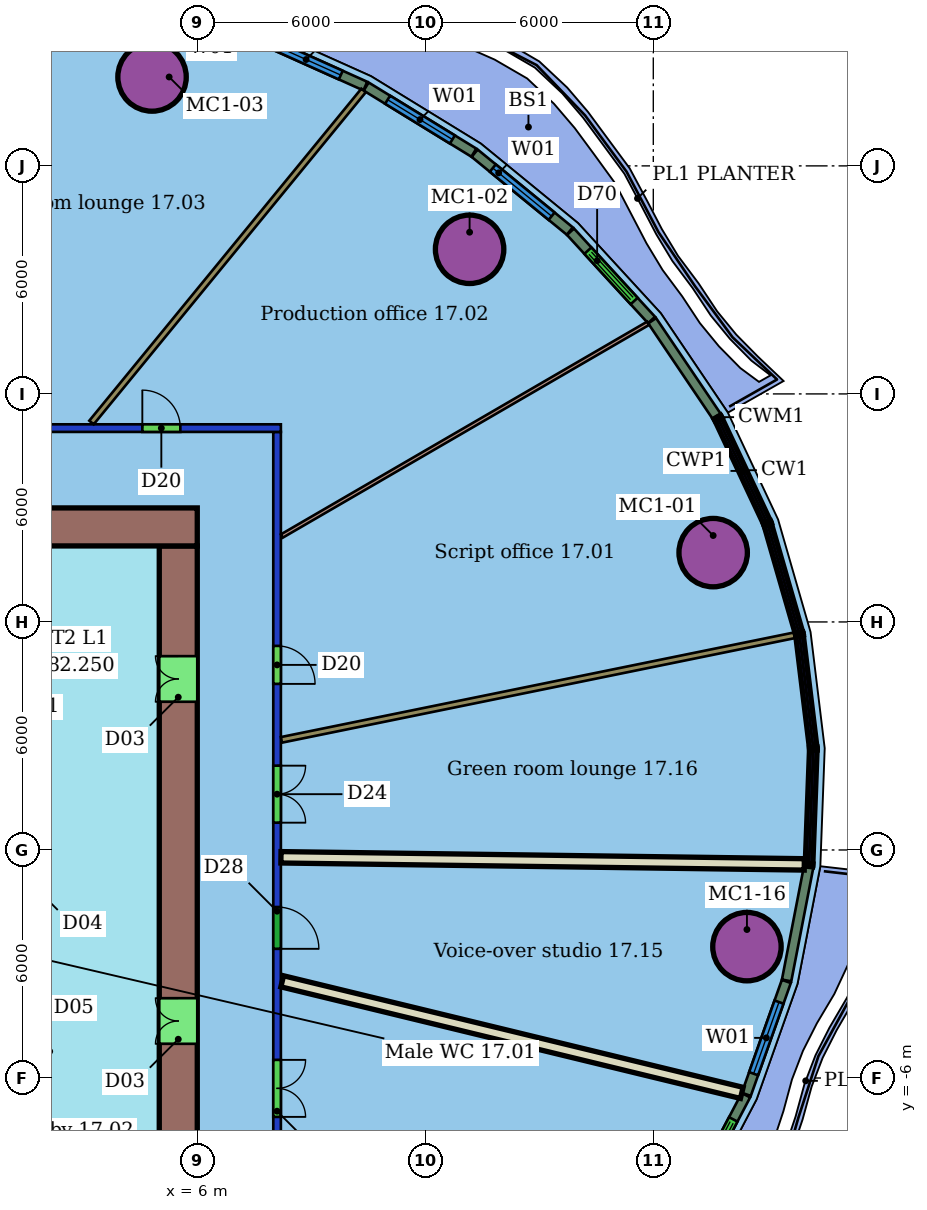
"""IFC4 building model, lengths in metres.
Left out: names, types, materials, properties, quantities, classifications, styles, units other than length and angle.
Written with IfcOpenShell. Run it as: python <this file> out.ifc"""

import sys

from ifc_helpers import new_model, si_unit, direction, frame, frame_2d, origin, origin_2d, place, context, subcontext, project, spatial, rectangle, hollow_circle, extrude, element, fill, save


model = new_model("IFC4")
c1 = context("Model", 3, precision=1e-05, world=origin(), true_north=direction((0.0, 1.0)))
c2 = subcontext(c1, "Body", "Model", "MODEL_VIEW")
j1 = project(units=[si_unit("LENGTHUNIT", "METRE"), si_unit("PLANEANGLEUNIT", "RADIAN")], contexts=[c1])
p1 = place(None, origin())
s1 = spatial("IfcSite", under=j1, at=p1, CompositionType="ELEMENT")
p2 = place(p1, origin())
s2 = spatial("IfcBuilding", under=s1, at=p2, CompositionType="ELEMENT")
p3 = place(p2, frame((0.0, 0.0, 80.4)))
s3 = spatial("IfcBuildingStorey", under=s2, at=p3, CompositionType="ELEMENT", Elevation=80.4)
for number, where, z_axis, x_axis in (
    (1, (19.575, 7.824, 0.0), (0.0, 0.0, 1.0), (1.0, 0.0, 0.0)),
    (2, (13.166, 15.805, 0.0), (0.0, 0.0, 1.0), (1.0, 0.0, 0.0)),
    (3, (4.81, 20.339, 0.0), (0.0, 0.0, 1.0), (1.0, 0.0, 0.0)),
    (4, (20.464, -2.543, 0.0), (0.0, 0.0, 1.0), (1.0, 0.0, 0.0)),
):
    element("IfcColumn", number, at=place(p3, frame(where, z_axis=z_axis, x_axis=x_axis)), inside=s3, PredefinedType="COLUMN", context=c2, shape_type="SweptSolid", body=[
        extrude(hollow_circle(Radius=0.9, WallThickness=0.06, at=origin_2d()), origin(), (0.0, 0.0, 1.0), 3.5),
    ])
p4 = place(p3, frame((-20.2, 11.1, 0.0), z_axis=(0.0, 0.0, 1.0), x_axis=(1.0, 0.0, 0.0)))
e5 = element("IfcWall", 5, at=p4, inside=s3, PredefinedType="PARTITIONING", context=c2, shape_type="SweptSolid", body=[
    extrude(rectangle(XDim=28.4, YDim=0.2, at=frame_2d((14.2, 0.0))), origin(), (0.0, 0.0, 1.0), 2.8),
])
p5 = place(p4, frame((24.754, 0.0, 0.0)))
e6 = element("IfcOpeningElement", 6, at=p5, cuts=e5, PredefinedType="OPENING", context=c2, shape_type="SweptSolid", body=[
    extrude(rectangle(XDim=1.0, YDim=2.1, at=frame_2d((0.5, 1.05))), frame((0.0, 0.11, 0.0), z_axis=(0.0, -1.0, 0.0), x_axis=(1.0, 0.0, 0.0)), (0.0, 0.0, 1.0), 0.22),
])
p6 = place(p4, frame((18.838, 0.0, 0.0)))
e7 = element("IfcOpeningElement", 7, at=p6, cuts=e5, PredefinedType="OPENING", context=c2, shape_type="SweptSolid", body=[
    extrude(rectangle(XDim=1.5, YDim=2.1, at=frame_2d((0.75, 1.05))), frame((0.0, 0.11, 0.0), z_axis=(0.0, -1.0, 0.0), x_axis=(1.0, 0.0, 0.0)), (0.0, 0.0, 1.0), 0.22),
])
p7 = place(p4, frame((14.85, 0.0, 0.0)))
e8 = element("IfcOpeningElement", 8, at=p7, cuts=e5, PredefinedType="OPENING", context=c2, shape_type="SweptSolid", body=[
    extrude(rectangle(XDim=0.9, YDim=2.1, at=frame_2d((0.45, 1.05))), frame((0.0, 0.11, 0.0), z_axis=(0.0, -1.0, 0.0), x_axis=(1.0, 0.0, 0.0)), (0.0, 0.0, 1.0), 0.22),
])
p8 = place(p4, frame((7.977, 0.0, 0.0)))
e9 = element("IfcOpeningElement", 9, at=p8, cuts=e5, PredefinedType="OPENING", context=c2, shape_type="SweptSolid", body=[
    extrude(rectangle(XDim=1.2, YDim=2.1, at=frame_2d((0.6, 1.05))), frame((0.0, 0.11, 0.0), z_axis=(0.0, -1.0, 0.0), x_axis=(1.0, 0.0, 0.0)), (0.0, 0.0, 1.0), 0.22),
])
p9 = place(p3, frame((8.1, 11.0, 0.0), z_axis=(0.0, 0.0, 1.0), x_axis=(0.0, -1.0, 0.0)))
e10 = element("IfcWall", 10, at=p9, inside=s3, PredefinedType="PARTITIONING", context=c2, shape_type="SweptSolid", body=[
    extrude(rectangle(XDim=22.0, YDim=0.2, at=frame_2d((11.0, 0.0))), origin(), (0.0, 0.0, 1.0), 2.8),
])
p10 = place(p9, frame((5.63, 0.0, 0.0)))
e11 = element("IfcOpeningElement", 11, at=p10, cuts=e10, PredefinedType="OPENING", context=c2, shape_type="SweptSolid", body=[
    extrude(rectangle(XDim=1.0, YDim=2.1, at=frame_2d((0.5, 1.05))), frame((0.0, 0.11, 0.0), z_axis=(0.0, -1.0, 0.0), x_axis=(1.0, 0.0, 0.0)), (0.0, 0.0, 1.0), 0.22),
])
p11 = place(p9, frame((16.523, 0.0, 0.0)))
e12 = element("IfcOpeningElement", 12, at=p11, cuts=e10, PredefinedType="OPENING", context=c2, shape_type="SweptSolid", body=[
    extrude(rectangle(XDim=1.5, YDim=2.1, at=frame_2d((0.75, 1.05))), frame((0.0, 0.11, 0.0), z_axis=(0.0, -1.0, 0.0), x_axis=(1.0, 0.0, 0.0)), (0.0, 0.0, 1.0), 0.22),
])
p12 = place(p9, frame((12.501, 0.0, 0.0)))
e13 = element("IfcOpeningElement", 13, at=p12, cuts=e10, PredefinedType="OPENING", context=c2, shape_type="SweptSolid", body=[
    extrude(rectangle(XDim=1.1, YDim=2.1, at=frame_2d((0.55, 1.05))), frame((0.0, 0.11, 0.0), z_axis=(0.0, -1.0, 0.0), x_axis=(1.0, 0.0, 0.0)), (0.0, 0.0, 1.0), 0.22),
])
p13 = place(p9, frame((8.782, 0.0, 0.0)))
e14 = element("IfcOpeningElement", 14, at=p13, cuts=e10, PredefinedType="OPENING", context=c2, shape_type="SweptSolid", body=[
    extrude(rectangle(XDim=1.5, YDim=2.1, at=frame_2d((0.75, 1.05))), frame((0.0, 0.11, 0.0), z_axis=(0.0, -1.0, 0.0), x_axis=(1.0, 0.0, 0.0)), (0.0, 0.0, 1.0), 0.22),
])
p14 = place(p3, frame((21.722, 5.65, 0.0), z_axis=(0.0, 0.0, 1.0), x_axis=(-0.979854025466, -0.19971501891, 0.0)))
e15 = element("IfcWall", 15, at=p14, inside=s3, PredefinedType="PARTITIONING", context=c2, shape_type="SweptSolid", body=[
    extrude(rectangle(XDim=13.784, YDim=0.15, at=frame_2d((6.892, 0.0))), origin(), (0.0, 0.0, 1.0), 3.5),
])
p15 = place(p3, frame((17.864, 13.859, 0.0), z_axis=(0.0, 0.0, 1.0), x_axis=(-0.864751207242, -0.502200507341, 0.0)))
e16 = element("IfcWall", 16, at=p15, inside=s3, PredefinedType="PARTITIONING", context=c2, shape_type="SweptSolid", body=[
    extrude(rectangle(XDim=11.147, YDim=0.1, at=frame_2d((5.573, 0.0))), origin(), (0.0, 0.0, 1.0), 3.5),
])
p16 = place(p3, frame((10.375, 19.983, 0.0), z_axis=(0.0, 0.0, 1.0), x_axis=(-0.633830873212, -0.773471669916, 0.0)))
e17 = element("IfcWall", 17, at=p16, inside=s3, PredefinedType="PARTITIONING", context=c2, shape_type="SweptSolid", body=[
    extrude(rectangle(XDim=11.294, YDim=0.15, at=frame_2d((5.647, 0.0))), origin(), (0.0, 0.0, 1.0), 3.5),
])
p17 = place(p3, frame((20.329, -6.392, 0.0), z_axis=(0.0, 0.0, 1.0), x_axis=(-0.971774781558, 0.235910521021, 0.0)))
e18 = element("IfcWall", 18, at=p17, inside=s3, PredefinedType="PARTITIONING", context=c2, shape_type="SweptSolid", body=[
    extrude(rectangle(XDim=12.445, YDim=0.3, at=frame_2d((6.222, 0.0))), origin(), (0.0, 0.0, 1.0), 3.5),
])
p18 = place(p3, frame((21.973, -0.379, 0.0), z_axis=(0.0, 0.0, 1.0), x_axis=(-0.999908046775, 0.013560899459, 0.0)))
e19 = element("IfcWall", 19, at=p18, inside=s3, PredefinedType="PARTITIONING", context=c2, shape_type="SweptSolid", body=[
    extrude(rectangle(XDim=13.772, YDim=0.3, at=frame_2d((6.886, 0.0))), origin(), (0.0, 0.0, 1.0), 3.5),
])
p19 = place(p3, frame((19.671, 11.405, 0.0), z_axis=(0.0, 0.0, 1.0), x_axis=(-0.559489400894, 0.828837505357, 0.0)))
e20 = element("IfcWall", 20, at=p19, inside=s3, PredefinedType="SOLIDWALL", context=c2, shape_type="SweptSolid", body=[
    extrude(rectangle(XDim=3.041, YDim=0.25, at=frame_2d((1.521, 0.0))), origin(), (0.0, 0.0, 1.0), 3.1),
])
p20 = place(p3, frame((17.953, 13.946, 0.0), z_axis=(0.0, 0.0, 1.0), x_axis=(-0.676334681742, 0.736594459844, 0.0)))
e21 = element("IfcWall", 21, at=p20, inside=s3, PredefinedType="SOLIDWALL", context=c2, shape_type="SweptSolid", body=[
    extrude(rectangle(XDim=3.152, YDim=0.25, at=frame_2d((1.576, 0.0))), origin(), (0.0, 0.0, 1.0), 3.1),
])
p21 = place(p20, frame((0.676, 0.0, 0.0)))
e22 = element("IfcOpeningElement", 22, at=p21, cuts=e21, PredefinedType="OPENING", context=c2, shape_type="SweptSolid", body=[
    extrude(rectangle(XDim=1.8, YDim=2.4, at=frame_2d((0.9, 1.2))), frame((0.0, 0.135, 0.0), z_axis=(0.0, -1.0, 0.0), x_axis=(1.0, 0.0, 0.0)), (0.0, 0.0, 1.0), 0.27),
])
p22 = place(p3, frame((15.803, 16.285, 0.0), z_axis=(0.0, 0.0, 1.0), x_axis=(-0.774034625391, 0.633143268697, 0.0)))
e23 = element("IfcWall", 23, at=p22, inside=s3, PredefinedType="SOLIDWALL", context=c2, shape_type="SweptSolid", body=[
    extrude(rectangle(XDim=3.235, YDim=0.25, at=frame_2d((1.618, 0.0))), origin(), (0.0, 0.0, 1.0), 3.1),
])
p23 = place(p22, frame((0.618, 0.0, 0.8)))
e24 = element("IfcOpeningElement", 24, at=p23, cuts=e23, PredefinedType="OPENING", context=c2, shape_type="SweptSolid", body=[
    extrude(rectangle(XDim=2.0, YDim=2.2, at=frame_2d((1.0, 1.1))), frame((0.0, 0.135, 0.0), z_axis=(0.0, -1.0, 0.0), x_axis=(1.0, 0.0, 0.0)), (0.0, 0.0, 1.0), 0.27),
])
p24 = place(p3, frame((13.278, 18.348, 0.0), z_axis=(0.0, 0.0, 1.0), x_axis=(-0.85230041537, 0.523052580492, 0.0)))
e25 = element("IfcWall", 25, at=p24, inside=s3, PredefinedType="SOLIDWALL", context=c2, shape_type="SweptSolid", body=[
    extrude(rectangle(XDim=3.326, YDim=0.25, at=frame_2d((1.663, 0.0))), origin(), (0.0, 0.0, 1.0), 3.1),
])
p25 = place(p24, frame((0.663, 0.0, 0.8)))
e26 = element("IfcOpeningElement", 26, at=p25, cuts=e25, PredefinedType="OPENING", context=c2, shape_type="SweptSolid", body=[
    extrude(rectangle(XDim=2.0, YDim=2.2, at=frame_2d((1.0, 1.1))), frame((0.0, 0.135, 0.0), z_axis=(0.0, -1.0, 0.0), x_axis=(1.0, 0.0, 0.0)), (0.0, 0.0, 1.0), 0.27),
])
p26 = place(p3, frame((10.423, 20.099, 0.0), z_axis=(0.0, 0.0, 1.0), x_axis=(-0.912234110734, 0.409669290055, 0.0)))
e27 = element("IfcWall", 27, at=p26, inside=s3, PredefinedType="SOLIDWALL", context=c2, shape_type="SweptSolid", body=[
    extrude(rectangle(XDim=3.417, YDim=0.25, at=frame_2d((1.708, 0.0))), origin(), (0.0, 0.0, 1.0), 3.1),
])
p27 = place(p26, frame((0.708, 0.0, 0.8)))
e28 = element("IfcOpeningElement", 28, at=p27, cuts=e27, PredefinedType="OPENING", context=c2, shape_type="SweptSolid", body=[
    extrude(rectangle(XDim=2.0, YDim=2.2, at=frame_2d((1.0, 1.1))), frame((0.0, 0.135, 0.0), z_axis=(0.0, -1.0, 0.0), x_axis=(1.0, 0.0, 0.0)), (0.0, 0.0, 1.0), 0.27),
])
p28 = place(p3, frame((18.935, -9.318, 0.0), z_axis=(0.0, 0.0, 1.0), x_axis=(0.464455263318, 0.885596583314, 0.0)))
e29 = element("IfcWall", 29, at=p28, inside=s3, PredefinedType="SOLIDWALL", context=c2, shape_type="SweptSolid", body=[
    extrude(rectangle(XDim=3.235, YDim=0.25, at=frame_2d((1.618, 0.0))), origin(), (0.0, 0.0, 1.0), 3.1),
])
p29 = place(p28, frame((0.718, 0.0, 0.0)))
e30 = element("IfcOpeningElement", 30, at=p29, cuts=e29, PredefinedType="OPENING", context=c2, shape_type="SweptSolid", body=[
    extrude(rectangle(XDim=1.8, YDim=2.4, at=frame_2d((0.9, 1.2))), frame((0.0, 0.135, 0.0), z_axis=(0.0, -1.0, 0.0), x_axis=(1.0, 0.0, 0.0)), (0.0, 0.0, 1.0), 0.27),
])
p30 = place(p3, frame((20.448, -6.43, 0.0), z_axis=(0.0, 0.0, 1.0), x_axis=(0.334132445697, 0.942526131591, 0.0)))
e31 = element("IfcWall", 31, at=p30, inside=s3, PredefinedType="SOLIDWALL", context=c2, shape_type="SweptSolid", body=[
    extrude(rectangle(XDim=3.152, YDim=0.25, at=frame_2d((1.576, 0.0))), origin(), (0.0, 0.0, 1.0), 3.1),
])
p31 = place(p30, frame((0.576, 0.0, 0.8)))
e32 = element("IfcOpeningElement", 32, at=p31, cuts=e31, PredefinedType="OPENING", context=c2, shape_type="SweptSolid", body=[
    extrude(rectangle(XDim=2.0, YDim=2.2, at=frame_2d((1.0, 1.1))), frame((0.0, 0.135, 0.0), z_axis=(0.0, -1.0, 0.0), x_axis=(1.0, 0.0, 0.0)), (0.0, 0.0, 1.0), 0.27),
])
p32 = place(p3, frame((21.508, -3.433, 0.0), z_axis=(0.0, 0.0, 1.0), x_axis=(0.190508646818, 0.981685517611, 0.0)))
e33 = element("IfcWall", 33, at=p32, inside=s3, PredefinedType="SOLIDWALL", context=c2, shape_type="SweptSolid", body=[
    extrude(rectangle(XDim=3.041, YDim=0.25, at=frame_2d((1.521, 0.0))), origin(), (0.0, 0.0, 1.0), 3.1),
])
p33 = place(p3, frame((6.0, 8.5, 0.0), z_axis=(0.0, 0.0, 1.0), x_axis=(-1.0, 0.0, 0.0)))
e34 = element("IfcWall", 34, at=p33, inside=s3, PredefinedType="SHEAR", context=c2, shape_type="SweptSolid", body=[
    extrude(rectangle(XDim=12.0, YDim=1.0, at=frame_2d((6.0, 0.0))), origin(), (0.0, 0.0, 1.0), 3.4),
])
p34 = place(p33, frame((5.6, 0.0, 0.0)))
e35 = element("IfcOpeningElement", 35, at=p34, cuts=e34, PredefinedType="OPENING", context=c2, shape_type="SweptSolid", body=[
    extrude(rectangle(XDim=1.2, YDim=2.1, at=frame_2d((0.6, 1.05))), frame((0.0, 0.51, 0.0), z_axis=(0.0, -1.0, 0.0), x_axis=(1.0, 0.0, 0.0)), (0.0, 0.0, 1.0), 1.02),
])
p35 = place(p3, frame((5.5, -8.0, 0.0), z_axis=(0.0, 0.0, 1.0), x_axis=(0.0, 1.0, 0.0)))
e36 = element("IfcWall", 36, at=p35, inside=s3, PredefinedType="SHEAR", context=c2, shape_type="SweptSolid", body=[
    extrude(rectangle(XDim=16.0, YDim=1.0, at=frame_2d((8.0, 0.0))), origin(), (0.0, 0.0, 1.0), 3.4),
])
p36 = place(p35, frame((2.9, 0.0, 0.0)))
e37 = element("IfcOpeningElement", 37, at=p36, cuts=e36, PredefinedType="OPENING", context=c2, shape_type="SweptSolid", body=[
    extrude(rectangle(XDim=1.2, YDim=2.1, at=frame_2d((0.6, 1.05))), frame((0.0, 0.51, 0.0), z_axis=(0.0, -1.0, 0.0), x_axis=(1.0, 0.0, 0.0)), (0.0, 0.0, 1.0), 1.02),
])
p37 = place(p35, frame((11.9, 0.0, 0.0)))
e38 = element("IfcOpeningElement", 38, at=p37, cuts=e36, PredefinedType="OPENING", context=c2, shape_type="SweptSolid", body=[
    extrude(rectangle(XDim=1.2, YDim=2.1, at=frame_2d((0.6, 1.05))), frame((0.0, 0.51, 0.0), z_axis=(0.0, -1.0, 0.0), x_axis=(1.0, 0.0, 0.0)), (0.0, 0.0, 1.0), 1.02),
])
p38 = place(p10, origin())
e39 = element("IfcDoor", 39, at=p38, inside=s3, OperationType="SINGLE_SWING_RIGHT", PredefinedType="DOOR", context=c2, shape_type="SweptSolid", body=[
    extrude(rectangle(XDim=1.0, YDim=2.1, at=frame_2d((0.5, 1.05))), frame((0.0, 0.025, 0.0), z_axis=(0.0, -1.0, 0.0), x_axis=(1.0, 0.0, 0.0)), (0.0, 0.0, 1.0), 0.05),
])
fill(e11, e39)
p39 = place(p5, origin())
e40 = element("IfcDoor", 40, at=p39, inside=s3, OperationType="SINGLE_SWING_LEFT", PredefinedType="DOOR", context=c2, shape_type="SweptSolid", body=[
    extrude(rectangle(XDim=1.0, YDim=2.1, at=frame_2d((0.5, 1.05))), frame((0.0, 0.025, 0.0), z_axis=(0.0, -1.0, 0.0), x_axis=(1.0, 0.0, 0.0)), (0.0, 0.0, 1.0), 0.05),
])
fill(e6, e40)
p40 = place(p11, origin())
e41 = element("IfcDoor", 41, at=p40, inside=s3, OperationType="DOUBLE_DOOR_SINGLE_SWING", PredefinedType="DOOR", context=c2, shape_type="SweptSolid", body=[
    extrude(rectangle(XDim=1.5, YDim=2.1, at=frame_2d((0.75, 1.05))), frame((0.0, 0.025, 0.0), z_axis=(0.0, -1.0, 0.0), x_axis=(1.0, 0.0, 0.0)), (0.0, 0.0, 1.0), 0.05),
])
fill(e12, e41)
p41 = place(p12, origin())
e42 = element("IfcDoor", 42, at=p41, inside=s3, OperationType="SINGLE_SWING_RIGHT", PredefinedType="DOOR", context=c2, shape_type="SweptSolid", body=[
    extrude(rectangle(XDim=1.1, YDim=2.1, at=frame_2d((0.55, 1.05))), frame((0.0, 0.025, 0.0), z_axis=(0.0, -1.0, 0.0), x_axis=(1.0, 0.0, 0.0)), (0.0, 0.0, 1.0), 0.05),
])
fill(e13, e42)
p42 = place(p13, origin())
e43 = element("IfcDoor", 43, at=p42, inside=s3, OperationType="DOUBLE_DOOR_SINGLE_SWING", PredefinedType="DOOR", context=c2, shape_type="SweptSolid", body=[
    extrude(rectangle(XDim=1.5, YDim=2.1, at=frame_2d((0.75, 1.05))), frame((0.0, 0.025, 0.0), z_axis=(0.0, -1.0, 0.0), x_axis=(1.0, 0.0, 0.0)), (0.0, 0.0, 1.0), 0.05),
])
fill(e14, e43)
p43 = place(p21, origin())
e44 = element("IfcDoor", 44, at=p43, inside=s3, OperationType="DOUBLE_DOOR_SLIDING", PredefinedType="DOOR", context=c2, shape_type="SweptSolid", body=[
    extrude(rectangle(XDim=1.8, YDim=2.4, at=frame_2d((0.9, 1.2))), frame((0.0, 0.025, 0.0), z_axis=(0.0, -1.0, 0.0), x_axis=(1.0, 0.0, 0.0)), (0.0, 0.0, 1.0), 0.05),
])
fill(e22, e44)
p44 = place(p23, origin())
e45 = element("IfcWindow", 45, at=p44, inside=s3, PartitioningType="SINGLE_PANEL", PredefinedType="WINDOW", context=c2, shape_type="SweptSolid", body=[
    extrude(rectangle(XDim=2.0, YDim=2.2, at=frame_2d((1.0, 1.1))), frame((0.0, 0.03, 0.0), z_axis=(0.0, -1.0, 0.0), x_axis=(1.0, 0.0, 0.0)), (0.0, 0.0, 1.0), 0.06),
])
fill(e24, e45)
p45 = place(p25, origin())
e46 = element("IfcWindow", 46, at=p45, inside=s3, PartitioningType="SINGLE_PANEL", PredefinedType="WINDOW", context=c2, shape_type="SweptSolid", body=[
    extrude(rectangle(XDim=2.0, YDim=2.2, at=frame_2d((1.0, 1.1))), frame((0.0, 0.03, 0.0), z_axis=(0.0, -1.0, 0.0), x_axis=(1.0, 0.0, 0.0)), (0.0, 0.0, 1.0), 0.06),
])
fill(e26, e46)
p46 = place(p27, origin())
e47 = element("IfcWindow", 47, at=p46, inside=s3, PartitioningType="SINGLE_PANEL", PredefinedType="WINDOW", context=c2, shape_type="SweptSolid", body=[
    extrude(rectangle(XDim=2.0, YDim=2.2, at=frame_2d((1.0, 1.1))), frame((0.0, 0.03, 0.0), z_axis=(0.0, -1.0, 0.0), x_axis=(1.0, 0.0, 0.0)), (0.0, 0.0, 1.0), 0.06),
])
fill(e28, e47)
p47 = place(p29, origin())
e48 = element("IfcDoor", 48, at=p47, inside=s3, OperationType="DOUBLE_DOOR_SLIDING", PredefinedType="DOOR", context=c2, shape_type="SweptSolid", body=[
    extrude(rectangle(XDim=1.8, YDim=2.4, at=frame_2d((0.9, 1.2))), frame((0.0, 0.025, 0.0), z_axis=(0.0, -1.0, 0.0), x_axis=(1.0, 0.0, 0.0)), (0.0, 0.0, 1.0), 0.05),
])
fill(e30, e48)
p48 = place(p31, origin())
e49 = element("IfcWindow", 49, at=p48, inside=s3, PartitioningType="SINGLE_PANEL", PredefinedType="WINDOW", context=c2, shape_type="SweptSolid", body=[
    extrude(rectangle(XDim=2.0, YDim=2.2, at=frame_2d((1.0, 1.1))), frame((0.0, 0.03, 0.0), z_axis=(0.0, -1.0, 0.0), x_axis=(1.0, 0.0, 0.0)), (0.0, 0.0, 1.0), 0.06),
])
fill(e32, e49)
p49 = place(p36, origin())
e50 = element("IfcDoor", 50, at=p49, inside=s3, OperationType="DOUBLE_DOOR_SINGLE_SWING", PredefinedType="NOTDEFINED", context=c2, shape_type="SweptSolid", body=[
    extrude(rectangle(XDim=1.2, YDim=2.1, at=frame_2d((0.6, 1.05))), frame((0.0, 0.025, 0.0), z_axis=(0.0, -1.0, 0.0), x_axis=(1.0, 0.0, 0.0)), (0.0, 0.0, 1.0), 0.05),
])
fill(e37, e50)
p50 = place(p37, origin())
e51 = element("IfcDoor", 51, at=p50, inside=s3, OperationType="DOUBLE_DOOR_SINGLE_SWING", PredefinedType="NOTDEFINED", context=c2, shape_type="SweptSolid", body=[
    extrude(rectangle(XDim=1.2, YDim=2.1, at=frame_2d((0.6, 1.05))), frame((0.0, 0.025, 0.0), z_axis=(0.0, -1.0, 0.0), x_axis=(1.0, 0.0, 0.0)), (0.0, 0.0, 1.0), 0.05),
])
fill(e38, e51)
save(model, sys.argv[1])
